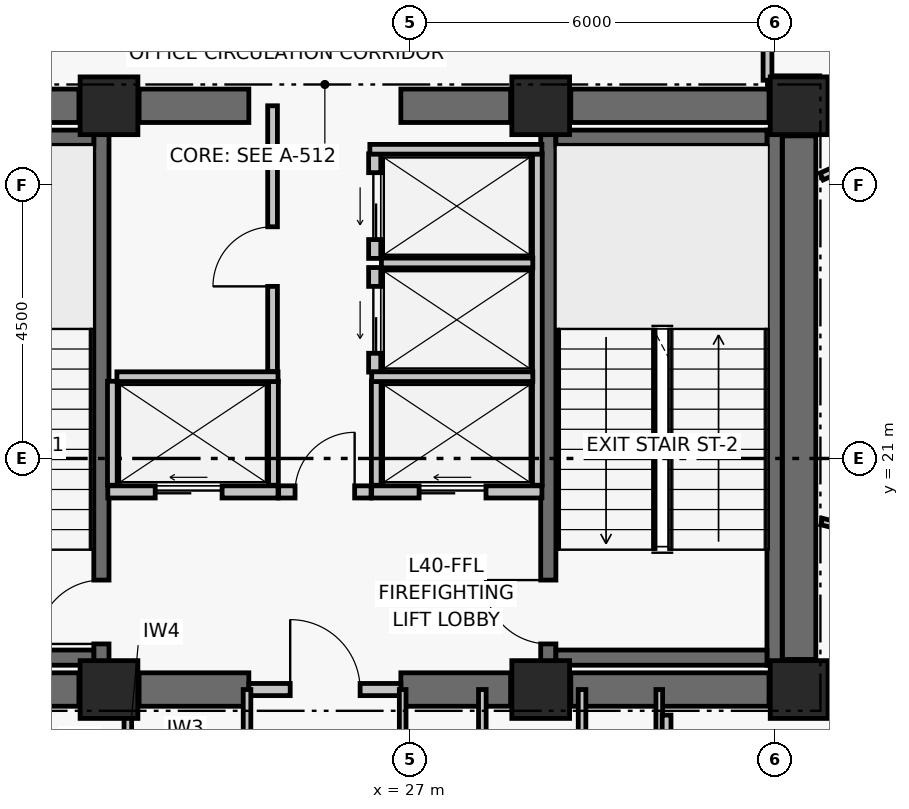
"""IFC4 building model, lengths in metres.
Left out: names, types, materials, properties, quantities, classifications, styles, units other than length and angle.
Written with IfcOpenShell. Run it as: python <this file> out.ifc"""

import sys

from ifc_helpers import new_model, si_unit, direction, frame, frame_2d, origin, origin_2d, place, context, subcontext, project, spatial, rectangle, extrude, element, fill, save


model = new_model("IFC4")
c1 = context("Model", 3, precision=1e-05, world=origin(), true_north=direction((0.0, 1.0)))
c2 = subcontext(c1, "Body", "Model", "MODEL_VIEW")
j1 = project(units=[si_unit("LENGTHUNIT", "METRE"), si_unit("PLANEANGLEUNIT", "RADIAN")], contexts=[c1])
p1 = place(None, origin())
s1 = spatial("IfcSite", under=j1, at=p1, CompositionType="ELEMENT")
p2 = place(p1, origin())
s2 = spatial("IfcBuilding", under=s1, at=p2, CompositionType="ELEMENT")
p3 = place(p2, frame((0.0, 0.0, 161.76)))
s3 = spatial("IfcBuildingStorey", under=s2, at=p3, CompositionType="ELEMENT", Elevation=161.76)
for number, where, z_axis, x_axis in (
    (1, (22.05, 17.2, 0.0), (0.0, 0.0, 1.0), (1.0, 0.0, 0.0)),
    (2, (29.15, 17.2, 0.0), (0.0, 0.0, 1.0), (1.0, 0.0, 0.0)),
    (3, (33.4, 17.2, 0.0), (0.0, 0.0, 1.0), (1.0, 0.0, 0.0)),
    (4, (22.05, 26.8, 0.0), (0.0, 0.0, 1.0), (1.0, 0.0, 0.0)),
    (5, (29.15, 26.8, 0.0), (0.0, 0.0, 1.0), (1.0, 0.0, 0.0)),
    (6, (33.4, 26.8, 0.0), (0.0, 0.0, 1.0), (1.0, 0.0, 0.0)),
):
    element("IfcColumn", number, at=place(p3, frame(where, z_axis=z_axis, x_axis=x_axis)), inside=s3, PredefinedType="COLUMN", context=c2, shape_type="SweptSolid", body=[
        extrude(rectangle(XDim=0.95, YDim=0.95, at=origin_2d()), origin(), (0.0, 0.0, 1.0), 3.72),
    ])
p4 = place(p3, frame((18.295, 17.2, 0.0), z_axis=(0.0, 0.0, 1.0), x_axis=(1.0, 0.0, 0.0)))
e7 = element("IfcWall", 7, at=p4, inside=s3, PredefinedType="SHEAR", context=c2, shape_type="SweptSolid", body=[
    extrude(rectangle(XDim=3.26, YDim=0.55, at=frame_2d((1.63, 0.0))), origin(), (0.0, 0.0, 1.0), 3.5),
])
p5 = place(p3, frame((22.545, 17.2, 0.0), z_axis=(0.0, 0.0, 1.0), x_axis=(1.0, 0.0, 0.0)))
e8 = element("IfcWall", 8, at=p5, inside=s3, PredefinedType="SHEAR", context=c2, shape_type="SweptSolid", body=[
    extrude(rectangle(XDim=1.805, YDim=0.55, at=frame_2d((0.903, 0.0))), origin(), (0.0, 0.0, 1.0), 3.5),
])
p6 = place(p3, frame((26.85, 17.2, 0.0), z_axis=(0.0, 0.0, 1.0), x_axis=(1.0, 0.0, 0.0)))
e9 = element("IfcWall", 9, at=p6, inside=s3, PredefinedType="SHEAR", context=c2, shape_type="SweptSolid", body=[
    extrude(rectangle(XDim=1.805, YDim=0.55, at=frame_2d((0.902, 0.0))), origin(), (0.0, 0.0, 1.0), 3.5),
])
for number, where, z_axis, x_axis in (
    (10, (29.645, 17.2, 0.0), (0.0, 0.0, 1.0), (1.0, 0.0, 0.0)),
    (11, (18.295, 26.8, 0.0), (0.0, 0.0, 1.0), (1.0, 0.0, 0.0)),
):
    element("IfcWall", number, at=place(p3, frame(where, z_axis=z_axis, x_axis=x_axis)), inside=s3, PredefinedType="SHEAR", context=c2, shape_type="SweptSolid", body=[
        extrude(rectangle(XDim=3.26, YDim=0.55, at=frame_2d((1.63, 0.0))), origin(), (0.0, 0.0, 1.0), 3.5),
    ])
p7 = place(p3, frame((22.545, 26.8, 0.0), z_axis=(0.0, 0.0, 1.0), x_axis=(1.0, 0.0, 0.0)))
e12 = element("IfcWall", 12, at=p7, inside=s3, PredefinedType="SHEAR", context=c2, shape_type="SweptSolid", body=[
    extrude(rectangle(XDim=1.805, YDim=0.55, at=frame_2d((0.903, 0.0))), origin(), (0.0, 0.0, 1.0), 3.5),
])
p8 = place(p3, frame((26.85, 26.8, 0.0), z_axis=(0.0, 0.0, 1.0), x_axis=(1.0, 0.0, 0.0)))
e13 = element("IfcWall", 13, at=p8, inside=s3, PredefinedType="SHEAR", context=c2, shape_type="SweptSolid", body=[
    extrude(rectangle(XDim=1.805, YDim=0.55, at=frame_2d((0.902, 0.0))), origin(), (0.0, 0.0, 1.0), 3.5),
])
p9 = place(p3, frame((29.645, 26.8, 0.0), z_axis=(0.0, 0.0, 1.0), x_axis=(1.0, 0.0, 0.0)))
e14 = element("IfcWall", 14, at=p9, inside=s3, PredefinedType="SHEAR", context=c2, shape_type="SweptSolid", body=[
    extrude(rectangle(XDim=3.26, YDim=0.55, at=frame_2d((1.63, 0.0))), origin(), (0.0, 0.0, 1.0), 3.5),
])
p10 = place(p3, frame((33.4, 17.695, 0.0), z_axis=(0.0, 0.0, 1.0), x_axis=(0.0, 1.0, 0.0)))
e15 = element("IfcWall", 15, at=p10, inside=s3, PredefinedType="SHEAR", context=c2, shape_type="SweptSolid", body=[
    extrude(rectangle(XDim=8.61, YDim=0.55, at=frame_2d((4.305, 0.0))), origin(), (0.0, 0.0, 1.0), 3.5),
])
p11 = place(p3, frame((21.925, 17.6, 0.0), z_axis=(0.0, 0.0, 1.0), x_axis=(0.0, 1.0, 0.0)))
e16 = element("IfcWall", 16, at=p11, inside=s3, PredefinedType="SHEAR", context=c2, shape_type="SweptSolid", body=[
    extrude(rectangle(XDim=8.8, YDim=0.25, at=frame_2d((4.4, 0.0))), origin(), (0.0, 0.0, 1.0), 3.5),
])
p12 = place(p11, frame((0.35, 0.0, 0.0)))
e17 = element("IfcOpeningElement", 17, at=p12, cuts=e16, PredefinedType="OPENING", context=c2, shape_type="SweptSolid", body=[
    extrude(rectangle(XDim=1.05, YDim=2.08, at=frame_2d((0.525, 1.04))), frame((0.0, 0.135, 0.0), z_axis=(0.0, -1.0, 0.0), x_axis=(1.0, 0.0, 0.0)), (0.0, 0.0, 1.0), 0.27),
])
for number, where, z_axis, x_axis in (
    (18, (18.329, 17.725, 0.0), (0.0, 0.0, 1.0), (1.0, 0.0, 0.0)),
    (19, (18.329, 26.275, 0.0), (0.0, 0.0, 1.0), (1.0, 0.0, 0.0)),
):
    element("IfcWall", number, at=place(p3, frame(where, z_axis=z_axis, x_axis=x_axis)), inside=s3, PredefinedType="SHEAR", context=c2, shape_type="SweptSolid", body=[
        extrude(rectangle(XDim=3.471, YDim=0.25, at=frame_2d((1.735, 0.0))), origin(), (0.0, 0.0, 1.0), 3.5),
    ])
p13 = place(p3, frame((29.275, 17.6, 0.0), z_axis=(0.0, 0.0, 1.0), x_axis=(0.0, 1.0, 0.0)))
e20 = element("IfcWall", 20, at=p13, inside=s3, PredefinedType="SHEAR", context=c2, shape_type="SweptSolid", body=[
    extrude(rectangle(XDim=8.8, YDim=0.25, at=frame_2d((4.4, 0.0))), origin(), (0.0, 0.0, 1.0), 3.5),
])
p14 = place(p13, frame((0.35, 0.0, 0.0)))
e21 = element("IfcOpeningElement", 21, at=p14, cuts=e20, PredefinedType="OPENING", context=c2, shape_type="SweptSolid", body=[
    extrude(rectangle(XDim=1.05, YDim=2.08, at=frame_2d((0.525, 1.04))), frame((0.0, 0.135, 0.0), z_axis=(0.0, -1.0, 0.0), x_axis=(1.0, 0.0, 0.0)), (0.0, 0.0, 1.0), 0.27),
])
p15 = place(p3, frame((32.996, 17.6, 0.0), z_axis=(0.0, 0.0, 1.0), x_axis=(0.0, 1.0, 0.0)))
e22 = element("IfcWall", 22, at=p15, inside=s3, PredefinedType="SHEAR", context=c2, shape_type="SweptSolid", body=[
    extrude(rectangle(XDim=8.8, YDim=0.25, at=frame_2d((4.4, 0.0))), origin(), (0.0, 0.0, 1.0), 3.5),
])
for number, where, z_axis, x_axis in (
    (23, (29.4, 17.725, 0.0), (0.0, 0.0, 1.0), (1.0, 0.0, 0.0)),
    (24, (29.4, 26.275, 0.0), (0.0, 0.0, 1.0), (1.0, 0.0, 0.0)),
):
    element("IfcWall", number, at=place(p3, frame(where, z_axis=z_axis, x_axis=x_axis)), inside=s3, PredefinedType="SHEAR", context=c2, shape_type="SweptSolid", body=[
        extrude(rectangle(XDim=3.471, YDim=0.25, at=frame_2d((1.736, 0.0))), origin(), (0.0, 0.0, 1.0), 3.5),
    ])
p16 = place(p3, frame((24.35, 17.2, 0.0), z_axis=(0.0, 0.0, 1.0), x_axis=(1.0, 0.0, 0.0)))
e25 = element("IfcWall", 25, at=p16, inside=s3, PredefinedType="PARTITIONING", context=c2, shape_type="SweptSolid", body=[
    extrude(rectangle(XDim=2.5, YDim=0.2, at=frame_2d((1.25, 0.0))), origin(), (0.0, 0.0, 1.0), 2.63),
])
p17 = place(p16, frame((0.68, 0.0, 0.0)))
e26 = element("IfcOpeningElement", 26, at=p17, cuts=e25, PredefinedType="OPENING", context=c2, shape_type="SweptSolid", body=[
    extrude(rectangle(XDim=1.15, YDim=2.08, at=frame_2d((0.575, 1.04))), frame((0.0, 0.11, 0.0), z_axis=(0.0, -1.0, 0.0), x_axis=(1.0, 0.0, 0.0)), (0.0, 0.0, 1.0), 0.22),
])
p18 = place(p3, frame((24.84, 20.45, 0.0), z_axis=(0.0, 0.0, 1.0), x_axis=(1.0, 0.0, 0.0)))
e27 = element("IfcWall", 27, at=p18, inside=s3, PredefinedType="PARTITIONING", context=c2, shape_type="SweptSolid", body=[
    extrude(rectangle(XDim=1.52, YDim=0.2, at=frame_2d((0.76, 0.0))), origin(), (0.0, 0.0, 1.0), 3.5),
])
p19 = place(p18, frame((0.27, 0.0, 0.0)))
e28 = element("IfcOpeningElement", 28, at=p19, cuts=e27, PredefinedType="OPENING", context=c2, shape_type="SweptSolid", body=[
    extrude(rectangle(XDim=0.98, YDim=2.06, at=frame_2d((0.49, 1.03))), frame((0.0, 0.11, 0.0), z_axis=(0.0, -1.0, 0.0), x_axis=(1.0, 0.0, 0.0)), (0.0, 0.0, 1.0), 0.22),
])
p20 = place(p3, frame((22.03, 20.45, 0.0), z_axis=(0.0, 0.0, 1.0), x_axis=(1.0, 0.0, 0.0)))
e29 = element("IfcWall", 29, at=p20, inside=s3, PredefinedType="PARTITIONING", context=c2, shape_type="SweptSolid", body=[
    extrude(rectangle(XDim=2.8, YDim=0.2, at=frame_2d((1.4, 0.0))), origin(), (0.0, 0.0, 1.0), 3.5),
])
p21 = place(p20, frame((0.78, 0.0, 0.0)))
e30 = element("IfcOpeningElement", 30, at=p21, cuts=e29, PredefinedType="OPENING", context=c2, shape_type="SweptSolid", body=[
    extrude(rectangle(XDim=1.1, YDim=2.08, at=frame_2d((0.55, 1.04))), frame((0.0, 0.11, 0.0), z_axis=(0.0, -1.0, 0.0), x_axis=(1.0, 0.0, 0.0)), (0.0, 0.0, 1.0), 0.22),
])
p22 = place(p3, frame((26.37, 20.45, 0.0), z_axis=(0.0, 0.0, 1.0), x_axis=(1.0, 0.0, 0.0)))
e31 = element("IfcWall", 31, at=p22, inside=s3, PredefinedType="PARTITIONING", context=c2, shape_type="SweptSolid", body=[
    extrude(rectangle(XDim=2.8, YDim=0.2, at=frame_2d((1.4, 0.0))), origin(), (0.0, 0.0, 1.0), 3.5),
])
p23 = place(p22, frame((0.78, 0.0, 0.0)))
e32 = element("IfcOpeningElement", 32, at=p23, cuts=e31, PredefinedType="OPENING", context=c2, shape_type="SweptSolid", body=[
    extrude(rectangle(XDim=1.1, YDim=2.08, at=frame_2d((0.55, 1.04))), frame((0.0, 0.11, 0.0), z_axis=(0.0, -1.0, 0.0), x_axis=(1.0, 0.0, 0.0)), (0.0, 0.0, 1.0), 0.22),
])
p24 = place(p3, frame((26.42, 22.42, 0.0), z_axis=(0.0, 0.0, 1.0), x_axis=(0.0, 1.0, 0.0)))
e33 = element("IfcWall", 33, at=p24, inside=s3, PredefinedType="PARTITIONING", context=c2, shape_type="SweptSolid", body=[
    extrude(rectangle(XDim=1.72, YDim=0.2, at=frame_2d((0.86, 0.0))), origin(), (0.0, 0.0, 1.0), 3.5),
])
p25 = place(p24, frame((0.31, 0.0, 0.0)))
e34 = element("IfcOpeningElement", 34, at=p25, cuts=e33, PredefinedType="OPENING", context=c2, shape_type="SweptSolid", body=[
    extrude(rectangle(XDim=1.1, YDim=2.08, at=frame_2d((0.55, 1.04))), frame((0.0, 0.11, 0.0), z_axis=(0.0, -1.0, 0.0), x_axis=(1.0, 0.0, 0.0)), (0.0, 0.0, 1.0), 0.22),
])
p26 = place(p3, frame((26.42, 24.29, 0.0), z_axis=(0.0, 0.0, 1.0), x_axis=(0.0, 1.0, 0.0)))
e35 = element("IfcWall", 35, at=p26, inside=s3, PredefinedType="PARTITIONING", context=c2, shape_type="SweptSolid", body=[
    extrude(rectangle(XDim=1.72, YDim=0.2, at=frame_2d((0.86, 0.0))), origin(), (0.0, 0.0, 1.0), 3.5),
])
p27 = place(p26, frame((0.31, 0.0, 0.0)))
e36 = element("IfcOpeningElement", 36, at=p27, cuts=e35, PredefinedType="OPENING", context=c2, shape_type="SweptSolid", body=[
    extrude(rectangle(XDim=1.1, YDim=2.08, at=frame_2d((0.55, 1.04))), frame((0.0, 0.11, 0.0), z_axis=(0.0, -1.0, 0.0), x_axis=(1.0, 0.0, 0.0)), (0.0, 0.0, 1.0), 0.22),
])
for number, where, z_axis, x_axis in (
    (37, (22.105, 20.56, 0.0), (0.0, 0.0, 1.0), (0.0, 1.0, 0.0)),
    (38, (24.755, 20.56, 0.0), (0.0, 0.0, 1.0), (0.0, 1.0, 0.0)),
):
    element("IfcWall", number, at=place(p3, frame(where, z_axis=z_axis, x_axis=x_axis)), inside=s3, PredefinedType="PARTITIONING", context=c2, shape_type="SweptSolid", body=[
        extrude(rectangle(XDim=1.71, YDim=0.16, at=frame_2d((0.855, 0.0))), origin(), (0.0, 0.0, 1.0), 3.5),
    ])
p28 = place(p3, frame((22.18, 22.345, 0.0), z_axis=(0.0, 0.0, 1.0), x_axis=(1.0, 0.0, 0.0)))
e39 = element("IfcWall", 39, at=p28, inside=s3, PredefinedType="PARTITIONING", context=c2, shape_type="SweptSolid", body=[
    extrude(rectangle(XDim=2.65, YDim=0.16, at=frame_2d((1.325, 0.0))), origin(), (0.0, 0.0, 1.0), 3.5),
])
p29 = place(p3, frame((29.095, 20.56, 0.0), z_axis=(0.0, 0.0, 1.0), x_axis=(0.0, 1.0, 0.0)))
e40 = element("IfcWall", 40, at=p29, inside=s3, PredefinedType="PARTITIONING", context=c2, shape_type="SweptSolid", body=[
    extrude(rectangle(XDim=5.45, YDim=0.16, at=frame_2d((2.725, 0.0))), origin(), (0.0, 0.0, 1.0), 3.5),
])
p30 = place(p3, frame((26.445, 20.56, 0.0), z_axis=(0.0, 0.0, 1.0), x_axis=(0.0, 1.0, 0.0)))
e41 = element("IfcWall", 41, at=p30, inside=s3, PredefinedType="PARTITIONING", context=c2, shape_type="SweptSolid", body=[
    extrude(rectangle(XDim=1.71, YDim=0.16, at=frame_2d((0.855, 0.0))), origin(), (0.0, 0.0, 1.0), 3.5),
])
p31 = place(p3, frame((26.37, 22.345, 0.0), z_axis=(0.0, 0.0, 1.0), x_axis=(1.0, 0.0, 0.0)))
e42 = element("IfcWall", 42, at=p31, inside=s3, PredefinedType="PARTITIONING", context=c2, shape_type="SweptSolid", body=[
    extrude(rectangle(XDim=2.65, YDim=0.16, at=frame_2d((1.325, 0.0))), origin(), (0.0, 0.0, 1.0), 3.5),
])
p32 = place(p3, frame((26.53, 24.215, 0.0), z_axis=(0.0, 0.0, 1.0), x_axis=(1.0, 0.0, 0.0)))
e43 = element("IfcWall", 43, at=p32, inside=s3, PredefinedType="PARTITIONING", context=c2, shape_type="SweptSolid", body=[
    extrude(rectangle(XDim=2.49, YDim=0.16, at=frame_2d((1.245, 0.0))), origin(), (0.0, 0.0, 1.0), 3.5),
])
p33 = place(p3, frame((26.34, 26.085, 0.0), z_axis=(0.0, 0.0, 1.0), x_axis=(1.0, 0.0, 0.0)))
e44 = element("IfcWall", 44, at=p33, inside=s3, PredefinedType="PARTITIONING", context=c2, shape_type="SweptSolid", body=[
    extrude(rectangle(XDim=2.83, YDim=0.16, at=frame_2d((1.415, 0.0))), origin(), (0.0, 0.0, 1.0), 3.5),
])
p34 = place(p3, frame((24.74, 22.43, 0.0), z_axis=(0.0, 0.0, 1.0), x_axis=(0.0, 1.0, 0.0)))
e45 = element("IfcWall", 45, at=p34, inside=s3, PredefinedType="PARTITIONING", context=c2, shape_type="SweptSolid", body=[
    extrude(rectangle(XDim=4.37, YDim=0.16, at=frame_2d((2.185, 0.0))), origin(), (0.0, 0.0, 1.0), 2.63),
])
p35 = place(p34, frame((1.4, 0.0, 0.0)))
e46 = element("IfcOpeningElement", 46, at=p35, cuts=e45, PredefinedType="OPENING", context=c2, shape_type="SweptSolid", body=[
    extrude(rectangle(XDim=0.98, YDim=2.06, at=frame_2d((0.49, 1.03))), frame((0.0, 0.09, 0.0), z_axis=(0.0, -1.0, 0.0), x_axis=(1.0, 0.0, 0.0)), (0.0, 0.0, 1.0), 0.18),
])
for number, where, z_axis, x_axis in (
    (47, (22.36, 14.95, 0.0), (0.0, 0.0, 1.0), (0.0, 1.0, 0.0)),
    (48, (24.32, 14.95, 0.0), (0.0, 0.0, 1.0), (0.0, 1.0, 0.0)),
):
    element("IfcWall", number, at=place(p3, frame(where, z_axis=z_axis, x_axis=x_axis)), inside=s3, PredefinedType="PARTITIONING", context=c2, shape_type="SweptSolid", body=[
        extrude(rectangle(XDim=2.25, YDim=0.125, at=frame_2d((1.125, 0.0))), origin(), (0.0, 0.0, 1.0), 2.63),
    ])
p36 = place(p3, frame((26.88, 14.95, 0.0), z_axis=(0.0, 0.0, 1.0), x_axis=(0.0, 1.0, 0.0)))
e49 = element("IfcWall", 49, at=p36, inside=s3, PredefinedType="PARTITIONING", context=c2, shape_type="SweptSolid", body=[
    extrude(rectangle(XDim=2.25, YDim=0.11, at=frame_2d((1.125, 0.0))), origin(), (0.0, 0.0, 1.0), 2.63),
])
for number, where, z_axis, x_axis in (
    (50, (28.19, 14.95, 0.0), (0.0, 0.0, 1.0), (0.0, 1.0, 0.0)),
    (51, (29.83, 14.95, 0.0), (0.0, 0.0, 1.0), (0.0, 1.0, 0.0)),
):
    element("IfcWall", number, at=place(p3, frame(where, z_axis=z_axis, x_axis=x_axis)), inside=s3, PredefinedType="PARTITIONING", context=c2, shape_type="SweptSolid", body=[
        extrude(rectangle(XDim=2.25, YDim=0.125, at=frame_2d((1.125, 0.0))), origin(), (0.0, 0.0, 1.0), 2.63),
    ])
p37 = place(p3, frame((31.1, 14.95, 0.0), z_axis=(0.0, 0.0, 1.0), x_axis=(0.0, 1.0, 0.0)))
e52 = element("IfcWall", 52, at=p37, inside=s3, PredefinedType="PARTITIONING", context=c2, shape_type="SweptSolid", body=[
    extrude(rectangle(XDim=2.25, YDim=0.11, at=frame_2d((1.125, 0.0))), origin(), (0.0, 0.0, 1.0), 2.63),
])
p38 = place(p3, frame((31.22, 14.93, 0.0), z_axis=(0.0, 0.0, 1.0), x_axis=(0.0, 1.0, 0.0)))
e53 = element("IfcWall", 53, at=p38, inside=s3, PredefinedType="PARTITIONING", context=c2, shape_type="SweptSolid", body=[
    extrude(rectangle(XDim=1.85, YDim=0.145, at=frame_2d((0.925, 0.0))), origin(), (0.0, 0.0, 1.0), 2.63),
])
p39 = place(p3, frame((33.74, 27.22, 0.0), z_axis=(0.0, 0.0, 1.0), x_axis=(-1.0, 0.0, 0.0)))
e54 = element("IfcWall", 54, at=p39, inside=s3, PredefinedType="PARTITIONING", context=c2, shape_type="SweptSolid", body=[
    extrude(rectangle(XDim=0.86, YDim=0.145, at=frame_2d((0.43, 0.0))), origin(), (0.0, 0.0, 1.0), 2.63),
])
p40 = place(p3, frame((32.88, 27.22, 0.0), z_axis=(0.0, 0.0, 1.0), x_axis=(0.0, 1.0, 0.0)))
e55 = element("IfcWall", 55, at=p40, inside=s3, PredefinedType="PARTITIONING", context=c2, shape_type="SweptSolid", body=[
    extrude(rectangle(XDim=1.48, YDim=0.145, at=frame_2d((0.74, 0.0))), origin(), (0.0, 0.0, 1.0), 2.63),
])
p41 = place(p3, frame((33.77, 25.637, 0.0), z_axis=(0.0, 0.0, 1.0), x_axis=(0.913542006179, 0.406744395102, 0.0)))
e56 = element("IfcWall", 56, at=p41, inside=s3, PredefinedType="PARTITIONING", context=c2, shape_type="SweptSolid", body=[
    extrude(rectangle(XDim=10.915, YDim=0.125, at=frame_2d((5.457, 0.0))), origin(), (0.0, 0.0, 1.0), 2.63),
])
p42 = place(p41, frame((6.177, 0.0, 0.0)))
e57 = element("IfcOpeningElement", 57, at=p42, cuts=e56, PredefinedType="OPENING", context=c2, shape_type="SweptSolid", body=[
    extrude(rectangle(XDim=0.92, YDim=2.05, at=frame_2d((0.46, 1.025))), frame((0.0, 0.073, 0.0), z_axis=(0.0, -1.0, 0.0), x_axis=(1.0, 0.0, 0.0)), (0.0, 0.0, 1.0), 0.145),
])
p43 = place(p3, frame((33.77, 19.963, 0.0), z_axis=(0.0, 0.0, 1.0), x_axis=(0.970295996232, -0.241920812863, 0.0)))
e58 = element("IfcWall", 58, at=p43, inside=s3, PredefinedType="PARTITIONING", context=c2, shape_type="SweptSolid", body=[
    extrude(rectangle(XDim=15.138, YDim=0.11, at=frame_2d((7.569, 0.0))), origin(), (0.0, 0.0, 1.0), 2.63),
])
p44 = place(p12, origin())
e59 = element("IfcDoor", 59, at=p44, inside=s3, OperationType="SINGLE_SWING_LEFT", PredefinedType="DOOR", context=c2, shape_type="SweptSolid", body=[
    extrude(rectangle(XDim=1.05, YDim=2.08, at=frame_2d((0.525, 1.04))), frame((0.0, 0.025, 0.0), z_axis=(0.0, -1.0, 0.0), x_axis=(1.0, 0.0, 0.0)), (0.0, 0.0, 1.0), 0.05),
])
fill(e17, e59)
p45 = place(p14, origin())
e60 = element("IfcDoor", 60, at=p45, inside=s3, OperationType="SINGLE_SWING_RIGHT", PredefinedType="DOOR", context=c2, shape_type="SweptSolid", body=[
    extrude(rectangle(XDim=1.05, YDim=2.08, at=frame_2d((0.525, 1.04))), frame((0.0, 0.025, 0.0), z_axis=(0.0, -1.0, 0.0), x_axis=(1.0, 0.0, 0.0)), (0.0, 0.0, 1.0), 0.05),
])
fill(e21, e60)
p46 = place(p17, origin())
e61 = element("IfcDoor", 61, at=p46, inside=s3, OperationType="SINGLE_SWING_LEFT", PredefinedType="DOOR", context=c2, shape_type="SweptSolid", body=[
    extrude(rectangle(XDim=1.15, YDim=2.08, at=frame_2d((0.575, 1.04))), frame((0.0, 0.025, 0.0), z_axis=(0.0, -1.0, 0.0), x_axis=(1.0, 0.0, 0.0)), (0.0, 0.0, 1.0), 0.05),
])
fill(e26, e61)
p47 = place(p19, origin())
e62 = element("IfcDoor", 62, at=p47, inside=s3, OperationType="SINGLE_SWING_RIGHT", PredefinedType="DOOR", context=c2, shape_type="SweptSolid", body=[
    extrude(rectangle(XDim=0.98, YDim=2.06, at=frame_2d((0.49, 1.03))), frame((0.0, 0.025, 0.0), z_axis=(0.0, -1.0, 0.0), x_axis=(1.0, 0.0, 0.0)), (0.0, 0.0, 1.0), 0.05),
])
fill(e28, e62)
p48 = place(p21, origin())
e63 = element("IfcDoor", 63, at=p48, inside=s3, OperationType="DOUBLE_DOOR_SLIDING", PredefinedType="DOOR", context=c2, shape_type="SweptSolid", body=[
    extrude(rectangle(XDim=1.1, YDim=2.08, at=frame_2d((0.55, 1.04))), frame((0.0, 0.025, 0.0), z_axis=(0.0, -1.0, 0.0), x_axis=(1.0, 0.0, 0.0)), (0.0, 0.0, 1.0), 0.05),
])
fill(e30, e63)
p49 = place(p23, origin())
e64 = element("IfcDoor", 64, at=p49, inside=s3, OperationType="DOUBLE_DOOR_SLIDING", PredefinedType="DOOR", context=c2, shape_type="SweptSolid", body=[
    extrude(rectangle(XDim=1.1, YDim=2.08, at=frame_2d((0.55, 1.04))), frame((0.0, 0.025, 0.0), z_axis=(0.0, -1.0, 0.0), x_axis=(1.0, 0.0, 0.0)), (0.0, 0.0, 1.0), 0.05),
])
fill(e32, e64)
p50 = place(p25, origin())
e65 = element("IfcDoor", 65, at=p50, inside=s3, OperationType="DOUBLE_DOOR_SLIDING", PredefinedType="DOOR", context=c2, shape_type="SweptSolid", body=[
    extrude(rectangle(XDim=1.1, YDim=2.08, at=frame_2d((0.55, 1.04))), frame((0.0, 0.025, 0.0), z_axis=(0.0, -1.0, 0.0), x_axis=(1.0, 0.0, 0.0)), (0.0, 0.0, 1.0), 0.05),
])
fill(e34, e65)
p51 = place(p27, origin())
e66 = element("IfcDoor", 66, at=p51, inside=s3, OperationType="DOUBLE_DOOR_SLIDING", PredefinedType="DOOR", context=c2, shape_type="SweptSolid", body=[
    extrude(rectangle(XDim=1.1, YDim=2.08, at=frame_2d((0.55, 1.04))), frame((0.0, 0.025, 0.0), z_axis=(0.0, -1.0, 0.0), x_axis=(1.0, 0.0, 0.0)), (0.0, 0.0, 1.0), 0.05),
])
fill(e36, e66)
p52 = place(p35, origin())
e67 = element("IfcDoor", 67, at=p52, inside=s3, OperationType="SINGLE_SWING_LEFT", PredefinedType="DOOR", context=c2, shape_type="SweptSolid", body=[
    extrude(rectangle(XDim=0.98, YDim=2.06, at=frame_2d((0.49, 1.03))), frame((0.0, 0.025, 0.0), z_axis=(0.0, -1.0, 0.0), x_axis=(1.0, 0.0, 0.0)), (0.0, 0.0, 1.0), 0.05),
])
fill(e46, e67)
save(model, sys.argv[1])
